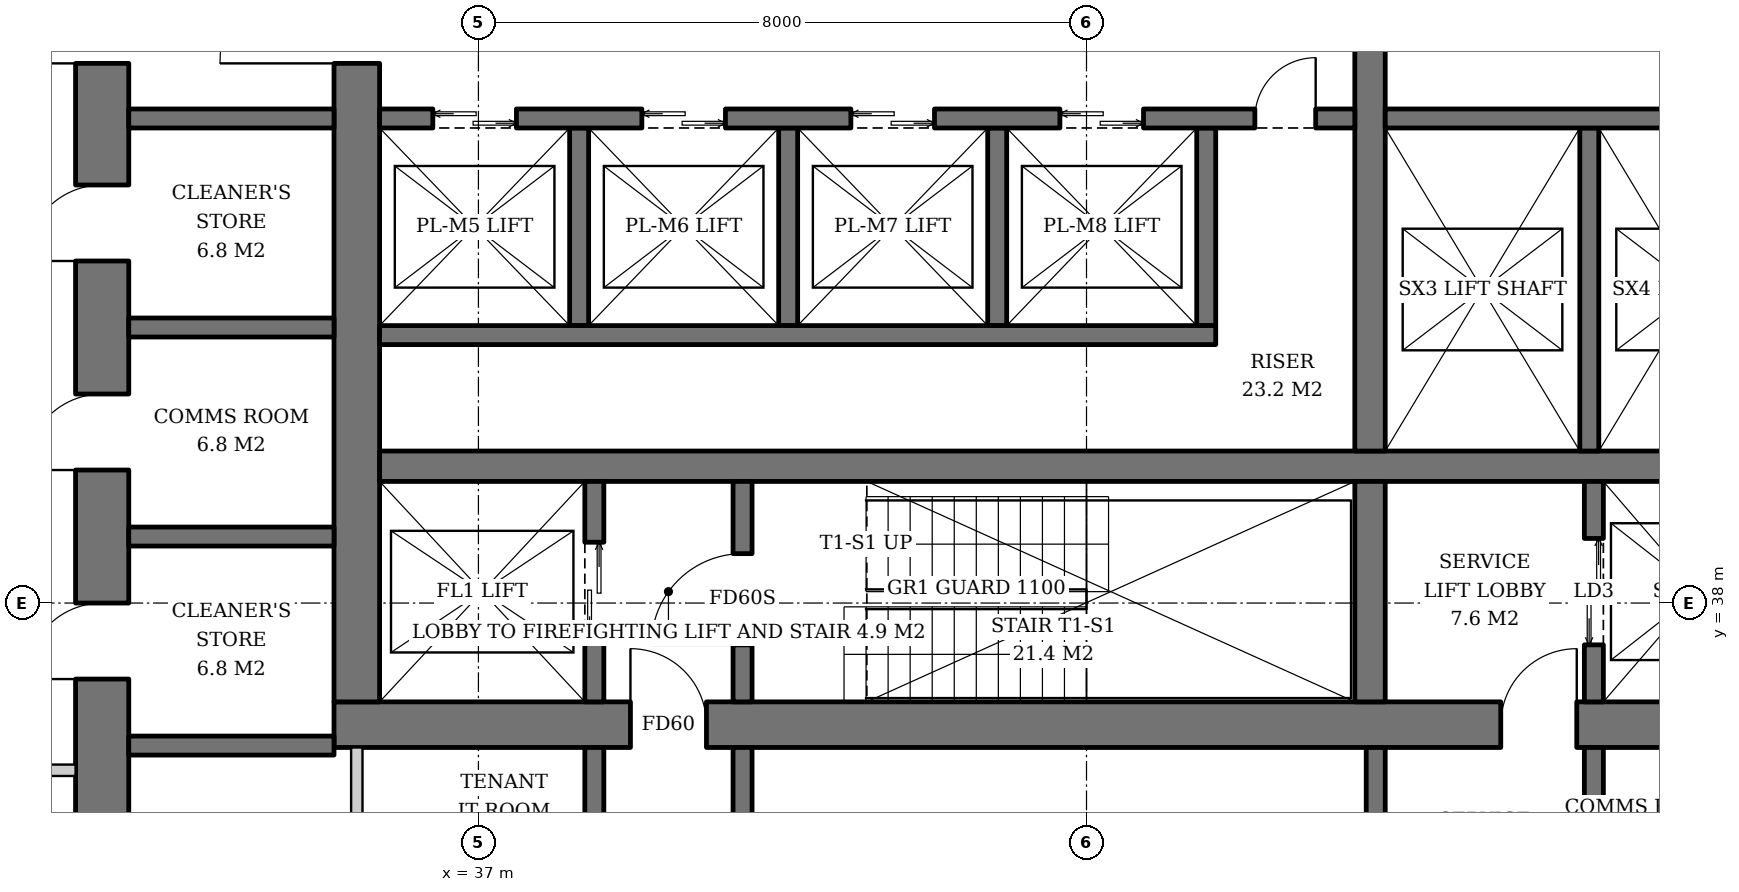
"""IFC4 building model, lengths in metres.
Left out: names, types, materials, properties, quantities, classifications, styles, units other than length and angle.
Written with IfcOpenShell. Run it as: python <this file> out.ifc"""

import sys

from ifc_helpers import new_model, si_unit, direction, frame, frame_2d, origin, place, context, subcontext, project, spatial, rectangle, extrude, element, fill, save


model = new_model("IFC4")
c1 = context("Model", 3, precision=1e-05, world=origin(), true_north=direction((0.0, 1.0)))
c2 = subcontext(c1, "Body", "Model", "MODEL_VIEW")
j1 = project(units=[si_unit("LENGTHUNIT", "METRE"), si_unit("PLANEANGLEUNIT", "RADIAN")], contexts=[c1])
p1 = place(None, origin())
s1 = spatial("IfcSite", under=j1, at=p1, CompositionType="ELEMENT")
p2 = place(p1, origin())
s2 = spatial("IfcBuilding", under=s1, at=p2, CompositionType="ELEMENT")
p3 = place(p2, frame((0.0, 0.0, 135.0)))
s3 = spatial("IfcBuildingStorey", under=s2, at=p3, CompositionType="ELEMENT", Elevation=135.0)
p4 = place(p3, frame((35.1, 36.4, 0.0), z_axis=(0.0, 0.0, 1.0), x_axis=(1.0, 0.0, 0.0)))
e1 = element("IfcWall", 1, at=p4, inside=s3, PredefinedType="SHEAR", context=c2, shape_type="SweptSolid", body=[
    extrude(rectangle(XDim=19.8, YDim=0.6, at=frame_2d((9.9, 0.0))), origin(), (0.0, 0.0, 1.0), 3.8),
])
p5 = place(p4, frame((3.9, 0.0, 0.0)))
e2 = element("IfcOpeningElement", 2, at=p5, cuts=e1, PredefinedType="OPENING", context=c2, shape_type="SweptSolid", body=[
    extrude(rectangle(XDim=1.0, YDim=2.1, at=frame_2d((0.5, 1.05))), frame((0.0, 0.31, 0.0), z_axis=(0.0, -1.0, 0.0), x_axis=(1.0, 0.0, 0.0)), (0.0, 0.0, 1.0), 0.62),
])
p6 = place(p4, frame((15.35, 0.0, 0.0)))
e3 = element("IfcOpeningElement", 3, at=p6, cuts=e1, PredefinedType="OPENING", context=c2, shape_type="SweptSolid", body=[
    extrude(rectangle(XDim=1.0, YDim=2.1, at=frame_2d((0.5, 1.05))), frame((0.0, 0.31, 0.0), z_axis=(0.0, -1.0, 0.0), x_axis=(1.0, 0.0, 0.0)), (0.0, 0.0, 1.0), 0.62),
])
p7 = place(p3, frame((35.4, 36.7, 0.0), z_axis=(0.0, 0.0, 1.0), x_axis=(0.0, 1.0, 0.0)))
e4 = element("IfcWall", 4, at=p7, inside=s3, PredefinedType="SHEAR", context=c2, shape_type="SweptSolid", body=[
    extrude(rectangle(XDim=18.6, YDim=0.6, at=frame_2d((9.3, 0.0))), origin(), (0.0, 0.0, 1.0), 3.8),
])
p8 = place(p7, frame((8.4, 0.0, 0.0)))
e5 = element("IfcOpeningElement", 5, at=p8, cuts=e4, PredefinedType="OPENING", context=c2, shape_type="SweptSolid", body=[
    extrude(rectangle(XDim=1.8, YDim=2.4, at=frame_2d((0.9, 1.2))), frame((0.0, 0.31, 0.0), z_axis=(0.0, -1.0, 0.0), x_axis=(1.0, 0.0, 0.0)), (0.0, 0.0, 1.0), 0.62),
])
p9 = place(p3, frame((32.05, 33.4, 0.0), z_axis=(0.0, 0.0, 1.0), x_axis=(0.0, 1.0, 0.0)))
e6 = element("IfcWall", 6, at=p9, inside=s3, PredefinedType="SHEAR", context=c2, shape_type="SweptSolid", body=[
    extrude(rectangle(XDim=25.2, YDim=0.7, at=frame_2d((12.6, 0.0))), origin(), (0.0, 0.0, 1.0), 3.8),
])
p10 = place(p9, frame((11.7, 0.0, 0.0)))
e7 = element("IfcOpeningElement", 7, at=p10, cuts=e6, PredefinedType="OPENING", context=c2, shape_type="SweptSolid", body=[
    extrude(rectangle(XDim=1.8, YDim=2.4, at=frame_2d((0.9, 1.2))), frame((0.0, 0.36, 0.0), z_axis=(0.0, -1.0, 0.0), x_axis=(1.0, 0.0, 0.0)), (0.0, 0.0, 1.0), 0.72),
])
p11 = place(p9, frame((3.6, 0.0, 0.0)))
e8 = element("IfcOpeningElement", 8, at=p11, cuts=e6, PredefinedType="OPENING", context=c2, shape_type="SweptSolid", body=[
    extrude(rectangle(XDim=1.0, YDim=2.1, at=frame_2d((0.5, 1.05))), frame((0.0, 0.36, 0.0), z_axis=(0.0, -1.0, 0.0), x_axis=(1.0, 0.0, 0.0)), (0.0, 0.0, 1.0), 0.72),
])
p12 = place(p9, frame((6.35, 0.0, 0.0)))
e9 = element("IfcOpeningElement", 9, at=p12, cuts=e6, PredefinedType="OPENING", context=c2, shape_type="SweptSolid", body=[
    extrude(rectangle(XDim=1.0, YDim=2.1, at=frame_2d((0.5, 1.05))), frame((0.0, 0.36, 0.0), z_axis=(0.0, -1.0, 0.0), x_axis=(1.0, 0.0, 0.0)), (0.0, 0.0, 1.0), 0.72),
])
p13 = place(p9, frame((9.1, 0.0, 0.0)))
e10 = element("IfcOpeningElement", 10, at=p13, cuts=e6, PredefinedType="OPENING", context=c2, shape_type="SweptSolid", body=[
    extrude(rectangle(XDim=1.0, YDim=2.1, at=frame_2d((0.5, 1.05))), frame((0.0, 0.36, 0.0), z_axis=(0.0, -1.0, 0.0), x_axis=(1.0, 0.0, 0.0)), (0.0, 0.0, 1.0), 0.72),
])
p14 = place(p9, frame((15.1, 0.0, 0.0)))
e11 = element("IfcOpeningElement", 11, at=p14, cuts=e6, PredefinedType="OPENING", context=c2, shape_type="SweptSolid", body=[
    extrude(rectangle(XDim=1.0, YDim=2.1, at=frame_2d((0.5, 1.05))), frame((0.0, 0.36, 0.0), z_axis=(0.0, -1.0, 0.0), x_axis=(1.0, 0.0, 0.0)), (0.0, 0.0, 1.0), 0.72),
])
p15 = place(p9, frame((17.85, 0.0, 0.0)))
e12 = element("IfcOpeningElement", 12, at=p15, cuts=e6, PredefinedType="OPENING", context=c2, shape_type="SweptSolid", body=[
    extrude(rectangle(XDim=1.0, YDim=2.1, at=frame_2d((0.5, 1.05))), frame((0.0, 0.36, 0.0), z_axis=(0.0, -1.0, 0.0), x_axis=(1.0, 0.0, 0.0)), (0.0, 0.0, 1.0), 0.72),
])
p16 = place(p3, frame((35.7, 39.8, 0.0), z_axis=(0.0, 0.0, 1.0), x_axis=(1.0, 0.0, 0.0)))
e13 = element("IfcWall", 13, at=p16, inside=s3, PredefinedType="SHEAR", context=c2, shape_type="SweptSolid", body=[
    extrude(rectangle(XDim=18.6, YDim=0.4, at=frame_2d((9.3, 0.0))), origin(), (0.0, 0.0, 1.0), 3.8),
])
p17 = place(p3, frame((48.73, 36.7, 0.0), z_axis=(0.0, 0.0, 1.0), x_axis=(0.0, 1.0, 0.0)))
e14 = element("IfcWall", 14, at=p17, inside=s3, PredefinedType="SHEAR", context=c2, shape_type="SweptSolid", body=[
    extrude(rectangle(XDim=2.9, YDim=0.4, at=frame_2d((1.45, 0.0))), origin(), (0.0, 0.0, 1.0), 3.8),
])
p18 = place(p3, frame((48.73, 40.0, 0.0), z_axis=(0.0, 0.0, 1.0), x_axis=(0.0, 1.0, 0.0)))
e15 = element("IfcWall", 15, at=p18, inside=s3, PredefinedType="SHEAR", context=c2, shape_type="SweptSolid", body=[
    extrude(rectangle(XDim=12.0, YDim=0.4, at=frame_2d((6.0, 0.0))), origin(), (0.0, 0.0, 1.0), 3.8),
])
p19 = place(p3, frame((38.525, 36.7, 0.0), z_axis=(0.0, 0.0, 1.0), x_axis=(0.0, 1.0, 0.0)))
e16 = element("IfcWall", 16, at=p19, inside=s3, PredefinedType="SHEAR", context=c2, shape_type="SweptSolid", body=[
    extrude(rectangle(XDim=2.9, YDim=0.25, at=frame_2d((1.45, 0.0))), origin(), (0.0, 0.0, 1.0), 3.8),
])
p20 = place(p19, frame((0.8, 0.0, 0.0)))
e17 = element("IfcOpeningElement", 17, at=p20, cuts=e16, PredefinedType="OPENING", context=c2, shape_type="SweptSolid", body=[
    extrude(rectangle(XDim=1.3, YDim=2.2, at=frame_2d((0.65, 1.1))), frame((0.0, 0.135, 0.0), z_axis=(0.0, -1.0, 0.0), x_axis=(1.0, 0.0, 0.0)), (0.0, 0.0, 1.0), 0.27),
])
p21 = place(p3, frame((40.475, 36.7, 0.0), z_axis=(0.0, 0.0, 1.0), x_axis=(0.0, 1.0, 0.0)))
e18 = element("IfcWall", 18, at=p21, inside=s3, PredefinedType="SHEAR", context=c2, shape_type="SweptSolid", body=[
    extrude(rectangle(XDim=2.9, YDim=0.25, at=frame_2d((1.45, 0.0))), origin(), (0.0, 0.0, 1.0), 3.8),
])
p22 = place(p21, frame((0.75, 0.0, 0.0)))
e19 = element("IfcOpeningElement", 19, at=p22, cuts=e18, PredefinedType="OPENING", context=c2, shape_type="SweptSolid", body=[
    extrude(rectangle(XDim=1.2, YDim=2.1, at=frame_2d((0.6, 1.05))), frame((0.0, 0.135, 0.0), z_axis=(0.0, -1.0, 0.0), x_axis=(1.0, 0.0, 0.0)), (0.0, 0.0, 1.0), 0.27),
])
p23 = place(p3, frame((51.675, 36.7, 0.0), z_axis=(0.0, 0.0, 1.0), x_axis=(0.0, 1.0, 0.0)))
e20 = element("IfcWall", 20, at=p23, inside=s3, PredefinedType="SHEAR", context=c2, shape_type="SweptSolid", body=[
    extrude(rectangle(XDim=2.9, YDim=0.25, at=frame_2d((1.45, 0.0))), origin(), (0.0, 0.0, 1.0), 3.8),
])
p24 = place(p23, frame((0.75, 0.0, 0.0)))
e21 = element("IfcOpeningElement", 21, at=p24, cuts=e20, PredefinedType="OPENING", context=c2, shape_type="SweptSolid", body=[
    extrude(rectangle(XDim=1.4, YDim=2.4, at=frame_2d((0.7, 1.2))), frame((0.0, 0.135, 0.0), z_axis=(0.0, -1.0, 0.0), x_axis=(1.0, 0.0, 0.0)), (0.0, 0.0, 1.0), 0.27),
])
for number, where, z_axis, x_axis in (
    (22, (38.325, 44.25, 0.0), (0.0, 0.0, 1.0), (0.0, -1.0, 0.0)),
    (23, (41.075, 44.25, 0.0), (0.0, 0.0, 1.0), (0.0, -1.0, 0.0)),
    (24, (43.825, 44.25, 0.0), (0.0, 0.0, 1.0), (0.0, -1.0, 0.0)),
    (25, (46.575, 44.25, 0.0), (0.0, 0.0, 1.0), (0.0, -1.0, 0.0)),
):
    element("IfcWall", number, at=place(p3, frame(where, z_axis=z_axis, x_axis=x_axis)), inside=s3, PredefinedType="SHEAR", context=c2, shape_type="SweptSolid", body=[
        extrude(rectangle(XDim=2.6, YDim=0.25, at=frame_2d((1.3, 0.0))), origin(), (0.0, 0.0, 1.0), 3.8),
    ])
p25 = place(p3, frame((35.7, 41.525, 0.0), z_axis=(0.0, 0.0, 1.0), x_axis=(1.0, 0.0, 0.0)))
e26 = element("IfcWall", 26, at=p25, inside=s3, PredefinedType="SHEAR", context=c2, shape_type="SweptSolid", body=[
    extrude(rectangle(XDim=11.0, YDim=0.25, at=frame_2d((5.5, 0.0))), origin(), (0.0, 0.0, 1.0), 3.8),
])
p26 = place(p3, frame((35.7, 44.375, 0.0), z_axis=(0.0, 0.0, 1.0), x_axis=(1.0, 0.0, 0.0)))
e27 = element("IfcWall", 27, at=p26, inside=s3, PredefinedType="SHEAR", context=c2, shape_type="SweptSolid", body=[
    extrude(rectangle(XDim=12.83, YDim=0.25, at=frame_2d((6.415, 0.0))), origin(), (0.0, 0.0, 1.0), 3.8),
])
p27 = place(p26, frame((0.7, 0.0, 0.0)))
e28 = element("IfcOpeningElement", 28, at=p27, cuts=e27, PredefinedType="OPENING", context=c2, shape_type="SweptSolid", body=[
    extrude(rectangle(XDim=1.1, YDim=2.2, at=frame_2d((0.55, 1.1))), frame((0.0, 0.135, 0.0), z_axis=(0.0, -1.0, 0.0), x_axis=(1.0, 0.0, 0.0)), (0.0, 0.0, 1.0), 0.27),
])
p28 = place(p26, frame((3.45, 0.0, 0.0)))
e29 = element("IfcOpeningElement", 29, at=p28, cuts=e27, PredefinedType="OPENING", context=c2, shape_type="SweptSolid", body=[
    extrude(rectangle(XDim=1.1, YDim=2.2, at=frame_2d((0.55, 1.1))), frame((0.0, 0.135, 0.0), z_axis=(0.0, -1.0, 0.0), x_axis=(1.0, 0.0, 0.0)), (0.0, 0.0, 1.0), 0.27),
])
p29 = place(p26, frame((6.2, 0.0, 0.0)))
e30 = element("IfcOpeningElement", 30, at=p29, cuts=e27, PredefinedType="OPENING", context=c2, shape_type="SweptSolid", body=[
    extrude(rectangle(XDim=1.1, YDim=2.2, at=frame_2d((0.55, 1.1))), frame((0.0, 0.135, 0.0), z_axis=(0.0, -1.0, 0.0), x_axis=(1.0, 0.0, 0.0)), (0.0, 0.0, 1.0), 0.27),
])
p30 = place(p26, frame((8.95, 0.0, 0.0)))
e31 = element("IfcOpeningElement", 31, at=p30, cuts=e27, PredefinedType="OPENING", context=c2, shape_type="SweptSolid", body=[
    extrude(rectangle(XDim=1.1, YDim=2.2, at=frame_2d((0.55, 1.1))), frame((0.0, 0.135, 0.0), z_axis=(0.0, -1.0, 0.0), x_axis=(1.0, 0.0, 0.0)), (0.0, 0.0, 1.0), 0.27),
])
p31 = place(p26, frame((11.515, 0.0, 0.0)))
e32 = element("IfcOpeningElement", 32, at=p31, cuts=e27, PredefinedType="OPENING", context=c2, shape_type="SweptSolid", body=[
    extrude(rectangle(XDim=0.8, YDim=2.0, at=frame_2d((0.4, 1.0))), frame((0.0, 0.135, 0.0), z_axis=(0.0, -1.0, 0.0), x_axis=(1.0, 0.0, 0.0)), (0.0, 0.0, 1.0), 0.27),
])
p32 = place(p3, frame((51.615, 44.25, 0.0), z_axis=(0.0, 0.0, 1.0), x_axis=(0.0, -1.0, 0.0)))
e33 = element("IfcWall", 33, at=p32, inside=s3, PredefinedType="SHEAR", context=c2, shape_type="SweptSolid", body=[
    extrude(rectangle(XDim=4.25, YDim=0.25, at=frame_2d((2.125, 0.0))), origin(), (0.0, 0.0, 1.0), 3.8),
])
p33 = place(p3, frame((48.93, 44.375, 0.0), z_axis=(0.0, 0.0, 1.0), x_axis=(1.0, 0.0, 0.0)))
e34 = element("IfcWall", 34, at=p33, inside=s3, PredefinedType="SHEAR", context=c2, shape_type="SweptSolid", body=[
    extrude(rectangle(XDim=5.37, YDim=0.25, at=frame_2d((2.685, 0.0))), origin(), (0.0, 0.0, 1.0), 3.8),
])
for number, where, z_axis, x_axis in (
    (35, (32.4, 36.125, 0.0), (0.0, 0.0, 1.0), (1.0, 0.0, 0.0)),
    (36, (32.4, 38.875, 0.0), (0.0, 0.0, 1.0), (1.0, 0.0, 0.0)),
    (37, (32.4, 41.625, 0.0), (0.0, 0.0, 1.0), (1.0, 0.0, 0.0)),
    (38, (32.4, 44.375, 0.0), (0.0, 0.0, 1.0), (1.0, 0.0, 0.0)),
):
    element("IfcWall", number, at=place(p3, frame(where, z_axis=z_axis, x_axis=x_axis)), inside=s3, PredefinedType="SHEAR", context=c2, shape_type="SweptSolid", body=[
        extrude(rectangle(XDim=2.7, YDim=0.25, at=frame_2d((1.35, 0.0))), origin(), (0.0, 0.0, 1.0), 3.8),
    ])
for number, where, z_axis, x_axis in (
    (39, (38.525, 33.4, 0.0), (0.0, 0.0, 1.0), (0.0, 1.0, 0.0)),
    (40, (40.475, 33.4, 0.0), (0.0, 0.0, 1.0), (0.0, 1.0, 0.0)),
    (41, (48.805, 33.4, 0.0), (0.0, 0.0, 1.0), (0.0, 1.0, 0.0)),
    (42, (51.675, 33.4, 0.0), (0.0, 0.0, 1.0), (0.0, 1.0, 0.0)),
):
    element("IfcWall", number, at=place(p3, frame(where, z_axis=z_axis, x_axis=x_axis)), inside=s3, PredefinedType="SOLIDWALL", context=c2, shape_type="SweptSolid", body=[
        extrude(rectangle(XDim=2.7, YDim=0.25, at=frame_2d((1.35, 0.0))), origin(), (0.0, 0.0, 1.0), 3.62),
    ])
p34 = place(p3, frame((35.4, 33.4, 0.0), z_axis=(0.0, 0.0, 1.0), x_axis=(0.0, 1.0, 0.0)))
e43 = element("IfcWall", 43, at=p34, inside=s3, PredefinedType="SOLIDWALL", context=c2, shape_type="SweptSolid", body=[
    extrude(rectangle(XDim=2.7, YDim=0.15, at=frame_2d((1.35, 0.0))), origin(), (0.0, 0.0, 1.0), 3.62),
])
p35 = place(p3, frame((31.7, 35.8, 0.0), z_axis=(0.0, 0.0, 1.0), x_axis=(-1.0, 0.0, 0.0)))
e44 = element("IfcWall", 44, at=p35, inside=s3, PredefinedType="PARTITIONING", context=c2, shape_type="SweptSolid", body=[
    extrude(rectangle(XDim=1.725, YDim=0.15, at=frame_2d((0.862, 0.0))), origin(), (0.0, 0.0, 1.0), 3.62),
])
p36 = place(p20, origin())
e45 = element("IfcDoor", 45, at=p36, inside=s3, OperationType="DOUBLE_DOOR_SLIDING", PredefinedType="DOOR", context=c2, shape_type="SweptSolid", body=[
    extrude(rectangle(XDim=1.3, YDim=2.2, at=frame_2d((0.65, 1.1))), frame((0.0, 0.025, 0.0), z_axis=(0.0, -1.0, 0.0), x_axis=(1.0, 0.0, 0.0)), (0.0, 0.0, 1.0), 0.05),
])
fill(e17, e45)
p37 = place(p22, origin())
e46 = element("IfcDoor", 46, at=p37, inside=s3, OperationType="SINGLE_SWING_LEFT", PredefinedType="DOOR", context=c2, shape_type="SweptSolid", body=[
    extrude(rectangle(XDim=1.2, YDim=2.1, at=frame_2d((0.6, 1.05))), frame((0.0, 0.025, 0.0), z_axis=(0.0, -1.0, 0.0), x_axis=(1.0, 0.0, 0.0)), (0.0, 0.0, 1.0), 0.05),
])
fill(e19, e46)
p38 = place(p24, origin())
e47 = element("IfcDoor", 47, at=p38, inside=s3, OperationType="DOUBLE_DOOR_SLIDING", PredefinedType="DOOR", context=c2, shape_type="SweptSolid", body=[
    extrude(rectangle(XDim=1.4, YDim=2.4, at=frame_2d((0.7, 1.2))), frame((0.0, 0.025, 0.0), z_axis=(0.0, -1.0, 0.0), x_axis=(1.0, 0.0, 0.0)), (0.0, 0.0, 1.0), 0.05),
])
fill(e21, e47)
p39 = place(p27, origin())
e48 = element("IfcDoor", 48, at=p39, inside=s3, OperationType="DOUBLE_DOOR_SLIDING", PredefinedType="DOOR", context=c2, shape_type="SweptSolid", body=[
    extrude(rectangle(XDim=1.1, YDim=2.2, at=frame_2d((0.55, 1.1))), frame((0.0, 0.025, 0.0), z_axis=(0.0, -1.0, 0.0), x_axis=(1.0, 0.0, 0.0)), (0.0, 0.0, 1.0), 0.05),
])
fill(e28, e48)
p40 = place(p28, origin())
e49 = element("IfcDoor", 49, at=p40, inside=s3, OperationType="DOUBLE_DOOR_SLIDING", PredefinedType="DOOR", context=c2, shape_type="SweptSolid", body=[
    extrude(rectangle(XDim=1.1, YDim=2.2, at=frame_2d((0.55, 1.1))), frame((0.0, 0.025, 0.0), z_axis=(0.0, -1.0, 0.0), x_axis=(1.0, 0.0, 0.0)), (0.0, 0.0, 1.0), 0.05),
])
fill(e29, e49)
p41 = place(p29, origin())
e50 = element("IfcDoor", 50, at=p41, inside=s3, OperationType="DOUBLE_DOOR_SLIDING", PredefinedType="DOOR", context=c2, shape_type="SweptSolid", body=[
    extrude(rectangle(XDim=1.1, YDim=2.2, at=frame_2d((0.55, 1.1))), frame((0.0, 0.025, 0.0), z_axis=(0.0, -1.0, 0.0), x_axis=(1.0, 0.0, 0.0)), (0.0, 0.0, 1.0), 0.05),
])
fill(e30, e50)
p42 = place(p30, origin())
e51 = element("IfcDoor", 51, at=p42, inside=s3, OperationType="DOUBLE_DOOR_SLIDING", PredefinedType="DOOR", context=c2, shape_type="SweptSolid", body=[
    extrude(rectangle(XDim=1.1, YDim=2.2, at=frame_2d((0.55, 1.1))), frame((0.0, 0.025, 0.0), z_axis=(0.0, -1.0, 0.0), x_axis=(1.0, 0.0, 0.0)), (0.0, 0.0, 1.0), 0.05),
])
fill(e31, e51)
p43 = place(p31, origin())
e52 = element("IfcDoor", 52, at=p43, inside=s3, OperationType="SINGLE_SWING_RIGHT", PredefinedType="DOOR", context=c2, shape_type="SweptSolid", body=[
    extrude(rectangle(XDim=0.8, YDim=2.0, at=frame_2d((0.4, 1.0))), frame((0.0, 0.025, 0.0), z_axis=(0.0, -1.0, 0.0), x_axis=(1.0, 0.0, 0.0)), (0.0, 0.0, 1.0), 0.05),
])
fill(e32, e52)
p44 = place(p5, origin())
e53 = element("IfcDoor", 53, at=p44, inside=s3, OperationType="SINGLE_SWING_LEFT", PredefinedType="DOOR", context=c2, shape_type="SweptSolid", body=[
    extrude(rectangle(XDim=1.0, YDim=2.1, at=frame_2d((0.5, 1.05))), frame((0.0, 0.025, 0.0), z_axis=(0.0, -1.0, 0.0), x_axis=(1.0, 0.0, 0.0)), (0.0, 0.0, 1.0), 0.05),
])
fill(e2, e53)
p45 = place(p8, origin())
e54 = element("IfcDoor", 54, at=p45, inside=s3, OperationType="DOUBLE_DOOR_SINGLE_SWING", PredefinedType="DOOR", context=c2, shape_type="SweptSolid", body=[
    extrude(rectangle(XDim=1.8, YDim=2.4, at=frame_2d((0.9, 1.2))), frame((0.0, 0.025, 0.0), z_axis=(0.0, -1.0, 0.0), x_axis=(1.0, 0.0, 0.0)), (0.0, 0.0, 1.0), 0.05),
])
fill(e5, e54)
p46 = place(p6, origin())
e55 = element("IfcDoor", 55, at=p46, inside=s3, OperationType="SINGLE_SWING_RIGHT", PredefinedType="DOOR", context=c2, shape_type="SweptSolid", body=[
    extrude(rectangle(XDim=1.0, YDim=2.1, at=frame_2d((0.5, 1.05))), frame((0.0, 0.025, 0.0), z_axis=(0.0, -1.0, 0.0), x_axis=(1.0, 0.0, 0.0)), (0.0, 0.0, 1.0), 0.05),
])
fill(e3, e55)
p47 = place(p10, origin())
e56 = element("IfcDoor", 56, at=p47, inside=s3, OperationType="DOUBLE_DOOR_SINGLE_SWING", PredefinedType="DOOR", context=c2, shape_type="SweptSolid", body=[
    extrude(rectangle(XDim=1.8, YDim=2.4, at=frame_2d((0.9, 1.2))), frame((0.0, 0.025, 0.0), z_axis=(0.0, -1.0, 0.0), x_axis=(1.0, 0.0, 0.0)), (0.0, 0.0, 1.0), 0.05),
])
fill(e7, e56)
p48 = place(p11, origin())
e57 = element("IfcDoor", 57, at=p48, inside=s3, OperationType="SINGLE_SWING_LEFT", PredefinedType="DOOR", context=c2, shape_type="SweptSolid", body=[
    extrude(rectangle(XDim=1.0, YDim=2.1, at=frame_2d((0.5, 1.05))), frame((0.0, -0.29, 0.0), z_axis=(0.0, -1.0, 0.0), x_axis=(1.0, 0.0, 0.0)), (0.0, 0.0, 1.0), 0.05),
])
fill(e8, e57)
p49 = place(p12, origin())
e58 = element("IfcDoor", 58, at=p49, inside=s3, OperationType="SINGLE_SWING_LEFT", PredefinedType="DOOR", context=c2, shape_type="SweptSolid", body=[
    extrude(rectangle(XDim=1.0, YDim=2.1, at=frame_2d((0.5, 1.05))), frame((0.0, -0.29, 0.0), z_axis=(0.0, -1.0, 0.0), x_axis=(1.0, 0.0, 0.0)), (0.0, 0.0, 1.0), 0.05),
])
fill(e9, e58)
p50 = place(p13, origin())
e59 = element("IfcDoor", 59, at=p50, inside=s3, OperationType="SINGLE_SWING_LEFT", PredefinedType="DOOR", context=c2, shape_type="SweptSolid", body=[
    extrude(rectangle(XDim=1.0, YDim=2.1, at=frame_2d((0.5, 1.05))), frame((0.0, -0.29, 0.0), z_axis=(0.0, -1.0, 0.0), x_axis=(1.0, 0.0, 0.0)), (0.0, 0.0, 1.0), 0.05),
])
fill(e10, e59)
save(model, sys.argv[1])
